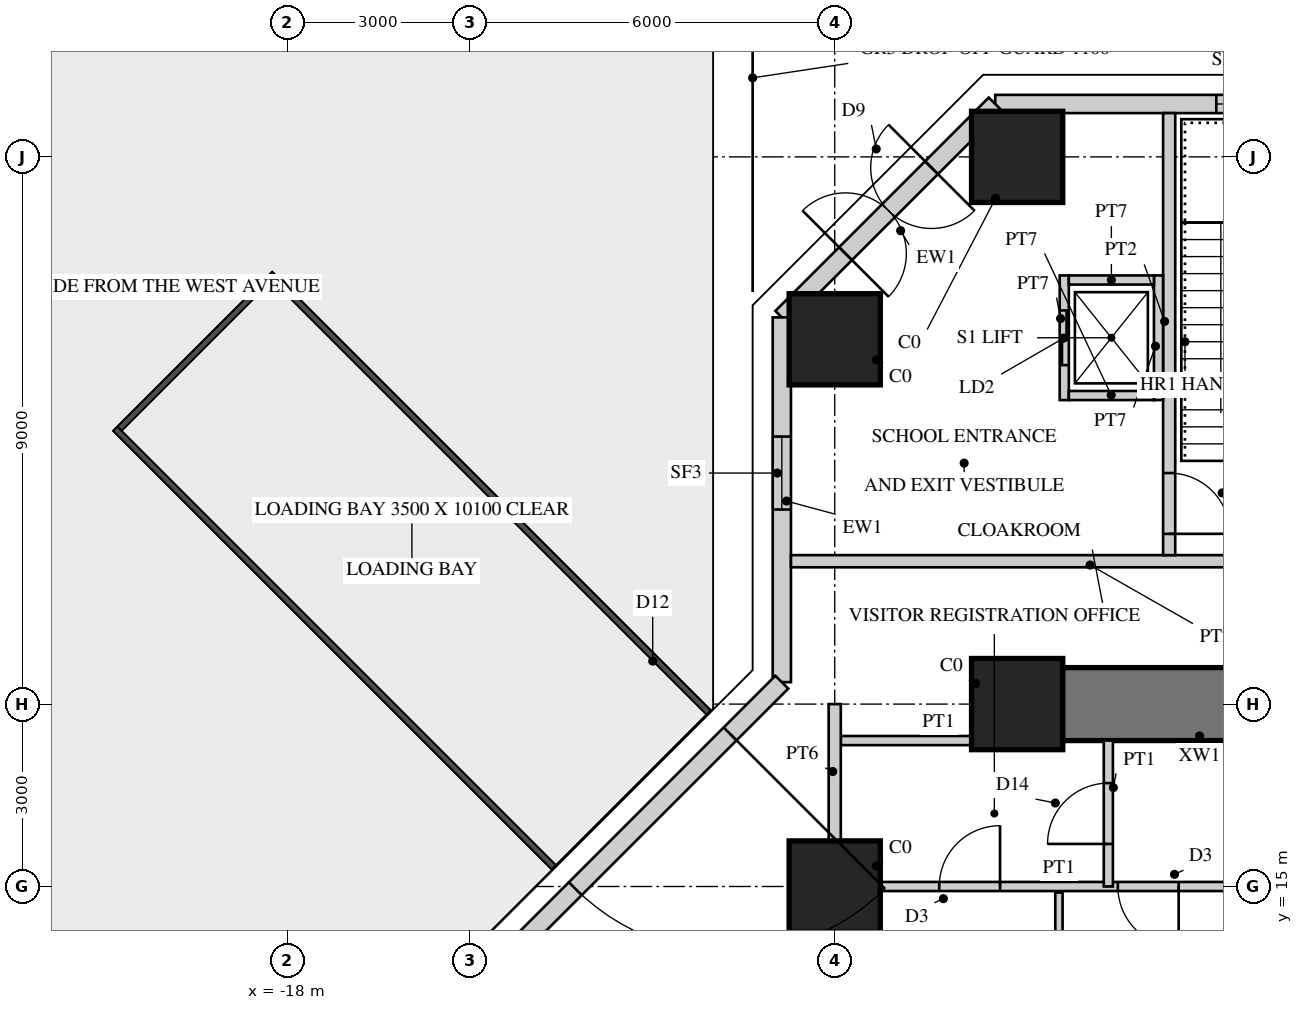
"""IFC4 building model, lengths in metres.
Left out: names, types, materials, properties, quantities, classifications, styles, units other than length and angle.
Written with IfcOpenShell. Run it as: python <this file> out.ifc"""

import sys

from ifc_helpers import new_model, si_unit, direction, frame, frame_2d, origin, origin_2d, place, context, subcontext, project, spatial, rectangle, hollow_rectangle, extrude, element, fill, save


model = new_model("IFC4")
c1 = context("Model", 3, precision=1e-05, world=origin(), true_north=direction((0.0, 1.0)))
c2 = subcontext(c1, "Body", "Model", "MODEL_VIEW")
j1 = project(units=[si_unit("LENGTHUNIT", "METRE"), si_unit("PLANEANGLEUNIT", "RADIAN")], contexts=[c1])
p1 = place(None, origin())
s1 = spatial("IfcSite", under=j1, at=p1, CompositionType="ELEMENT")
p2 = place(p1, origin())
s2 = spatial("IfcBuilding", under=s1, at=p2, CompositionType="ELEMENT")
p3 = place(p2, origin())
s3 = spatial("IfcBuildingStorey", under=s2, at=p3, CompositionType="ELEMENT", Elevation=0.0)
p4 = place(p3, frame((0.0, 18.0, 0.0), z_axis=(0.0, 0.0, 1.0), x_axis=(-1.0, 0.0, 0.0)))
e1 = element("IfcWall", 1, at=p4, inside=s3, PredefinedType="SHEAR", context=c2, shape_type="SweptSolid", body=[
    extrude(rectangle(XDim=6.0, YDim=1.2, at=frame_2d((3.0, 0.0))), origin(), (0.0, 0.0, 1.0), 5.0),
])
for number, where, z_axis, x_axis in (
    (2, (-9.0, 15.0, 0.0), (0.0, 0.0, 1.0), (1.0, 0.0, 0.0)),
    (3, (-9.0, 24.0, 0.0), (0.0, 0.0, 1.0), (1.0, 0.0, 0.0)),
    (4, (-6.0, 27.0, 0.0), (0.0, 0.0, 1.0), (1.0, 0.0, 0.0)),
    (5, (-6.0, 18.0, 0.0), (0.0, 0.0, 1.0), (1.0, 0.0, 0.0)),
):
    element("IfcColumn", number, at=place(p3, frame(where, z_axis=z_axis, x_axis=x_axis)), inside=s3, PredefinedType="COLUMN", context=c2, shape_type="SweptSolid", body=[
        extrude(rectangle(XDim=1.5, YDim=1.5, at=origin_2d()), origin(), (0.0, 0.0, 1.0), 5.0),
    ])
p5 = place(p3, frame((6.36, 27.87, 0.0), z_axis=(0.0, 0.0, 1.0), x_axis=(-1.0, 0.0, 0.0)))
e6 = element("IfcWall", 6, at=p5, inside=s3, PredefinedType="SOLIDWALL", context=c2, shape_type="SweptSolid", body=[
    extrude(rectangle(XDim=12.721, YDim=0.3, at=frame_2d((6.36, 0.0))), origin(), (0.0, 0.0, 1.0), 4.8),
])
p6 = place(p5, frame((3.11, 0.0, 0.0)))
e7 = element("IfcOpeningElement", 7, at=p6, cuts=e6, PredefinedType="OPENING", context=c2, shape_type="SweptSolid", body=[
    extrude(rectangle(XDim=2.0, YDim=2.6, at=frame_2d((1.0, 1.3))), frame((0.0, 0.16, 0.0), z_axis=(0.0, -1.0, 0.0), x_axis=(1.0, 0.0, 0.0)), (0.0, 0.0, 1.0), 0.32),
])
p7 = place(p5, frame((7.885, 0.0, 0.3)))
e8 = element("IfcOpeningElement", 8, at=p7, cuts=e6, PredefinedType="OPENING", context=c2, shape_type="SweptSolid", body=[
    extrude(rectangle(XDim=1.2, YDim=3.9, at=frame_2d((0.6, 1.95))), frame((0.0, 0.16, 0.0), z_axis=(0.0, -1.0, 0.0), x_axis=(1.0, 0.0, 0.0)), (0.0, 0.0, 1.0), 0.32),
])
p8 = place(p3, frame((-6.36, 27.87, 0.0), z_axis=(0.0, 0.0, 1.0), x_axis=(-0.707106781187, -0.707106781187, 0.0)))
e9 = element("IfcWall", 9, at=p8, inside=s3, PredefinedType="SOLIDWALL", context=c2, shape_type="SweptSolid", body=[
    extrude(rectangle(XDim=4.964, YDim=0.3, at=frame_2d((2.482, 0.0))), origin(), (0.0, 0.0, 1.0), 4.8),
])
p9 = place(p8, frame((1.482, 0.0, 0.0)))
e10 = element("IfcOpeningElement", 10, at=p9, cuts=e9, PredefinedType="OPENING", context=c2, shape_type="SweptSolid", body=[
    extrude(rectangle(XDim=2.0, YDim=2.6, at=frame_2d((1.0, 1.3))), frame((0.0, 0.16, 0.0), z_axis=(0.0, -1.0, 0.0), x_axis=(1.0, 0.0, 0.0)), (0.0, 0.0, 1.0), 0.32),
])
p10 = place(p3, frame((-9.87, 24.36, 0.0), z_axis=(0.0, 0.0, 1.0), x_axis=(0.0, -1.0, 0.0)))
e11 = element("IfcWall", 11, at=p10, inside=s3, PredefinedType="SOLIDWALL", context=c2, shape_type="SweptSolid", body=[
    extrude(rectangle(XDim=6.0, YDim=0.3, at=frame_2d((3.0, 0.0))), origin(), (0.0, 0.0, 1.0), 4.8),
])
p11 = place(p10, frame((1.96, 0.0, 0.3)))
e12 = element("IfcOpeningElement", 12, at=p11, cuts=e11, PredefinedType="OPENING", context=c2, shape_type="SweptSolid", body=[
    extrude(rectangle(XDim=1.2, YDim=3.9, at=frame_2d((0.6, 1.95))), frame((0.0, 0.16, 0.0), z_axis=(0.0, -1.0, 0.0), x_axis=(1.0, 0.0, 0.0)), (0.0, 0.0, 1.0), 0.32),
])
p12 = place(p3, frame((-9.87, 18.36, 0.0), z_axis=(0.0, 0.0, 1.0), x_axis=(-0.707106781187, -0.707106781187, 0.0)))
e13 = element("IfcWall", 13, at=p12, inside=s3, PredefinedType="SOLIDWALL", context=c2, shape_type="SweptSolid", body=[
    extrude(rectangle(XDim=12.007, YDim=0.3, at=frame_2d((6.003, 0.0))), origin(), (0.0, 0.0, 1.0), 4.8),
])
p13 = place(p12, frame((1.204, 0.0, 0.0)))
e14 = element("IfcOpeningElement", 14, at=p13, cuts=e13, PredefinedType="OPENING", context=c2, shape_type="SweptSolid", body=[
    extrude(rectangle(XDim=3.6, YDim=4.2, at=frame_2d((1.8, 2.1))), frame((0.0, 0.16, 0.0), z_axis=(0.0, -1.0, 0.0), x_axis=(1.0, 0.0, 0.0)), (0.0, 0.0, 1.0), 0.32),
])
p14 = place(p3, frame((-2.375, 15.0, 0.0), z_axis=(0.0, 0.0, 1.0), x_axis=(-1.0, 0.0, 0.0)))
e15 = element("IfcWall", 15, at=p14, inside=s3, PredefinedType="PARTITIONING", context=c2, shape_type="SweptSolid", body=[
    extrude(rectangle(XDim=5.875, YDim=0.15, at=frame_2d((2.938, 0.0))), origin(), (0.0, 0.0, 1.0), 3.85),
])
p15 = place(p14, frame((0.969, 0.0, 0.0)))
e16 = element("IfcOpeningElement", 16, at=p15, cuts=e15, PredefinedType="OPENING", context=c2, shape_type="SweptSolid", body=[
    extrude(rectangle(XDim=1.0, YDim=2.1, at=frame_2d((0.5, 1.05))), frame((0.0, 0.085, 0.0), z_axis=(0.0, -1.0, 0.0), x_axis=(1.0, 0.0, 0.0)), (0.0, 0.0, 1.0), 0.17),
])
p16 = place(p14, frame((3.906, 0.0, 0.0)))
e17 = element("IfcOpeningElement", 17, at=p16, cuts=e15, PredefinedType="OPENING", context=c2, shape_type="SweptSolid", body=[
    extrude(rectangle(XDim=1.0, YDim=2.1, at=frame_2d((0.5, 1.05))), frame((0.0, 0.085, 0.0), z_axis=(0.0, -1.0, 0.0), x_axis=(1.0, 0.0, 0.0)), (0.0, 0.0, 1.0), 0.17),
])
p17 = place(p3, frame((-5.312, 9.65, 0.0), z_axis=(0.0, 0.0, 1.0), x_axis=(0.0, 1.0, 0.0)))
e18 = element("IfcWall", 18, at=p17, inside=s3, PredefinedType="PLUMBINGWALL", context=c2, shape_type="SweptSolid", body=[
    extrude(rectangle(XDim=5.25, YDim=0.12, at=frame_2d((2.625, 0.0))), origin(), (0.0, 0.0, 1.0), 4.8),
])
p18 = place(p3, frame((-4.5, 15.0, 0.0), z_axis=(0.0, 0.0, 1.0), x_axis=(0.0, 1.0, 0.0)))
e19 = element("IfcWall", 19, at=p18, inside=s3, PredefinedType="PARTITIONING", context=c2, shape_type="SweptSolid", body=[
    extrude(rectangle(XDim=2.4, YDim=0.15, at=frame_2d((1.2, 0.0))), origin(), (0.0, 0.0, 1.0), 4.8),
])
p19 = place(p18, frame((0.7, 0.0, 0.0)))
e20 = element("IfcOpeningElement", 20, at=p19, cuts=e19, PredefinedType="OPENING", context=c2, shape_type="SweptSolid", body=[
    extrude(rectangle(XDim=1.0, YDim=2.2, at=frame_2d((0.5, 1.1))), frame((0.0, 0.085, 0.0), z_axis=(0.0, -1.0, 0.0), x_axis=(1.0, 0.0, 0.0)), (0.0, 0.0, 1.0), 0.17),
])
p20 = place(p3, frame((-0.1, 20.35, 0.0), z_axis=(0.0, 0.0, 1.0), x_axis=(-1.0, 0.0, 0.0)))
e21 = element("IfcWall", 21, at=p20, inside=s3, PredefinedType="SOLIDWALL", context=c2, shape_type="SweptSolid", body=[
    extrude(rectangle(XDim=9.62, YDim=0.2, at=frame_2d((4.81, 0.0))), origin(), (0.0, 0.0, 1.0), 4.8),
])
p21 = place(p3, frame((-3.5, 20.45, 0.0), z_axis=(0.0, 0.0, 1.0), x_axis=(0.0, 1.0, 0.0)))
e22 = element("IfcWall", 22, at=p21, inside=s3, PredefinedType="SOLIDWALL", context=c2, shape_type="SweptSolid", body=[
    extrude(rectangle(XDim=7.27, YDim=0.2, at=frame_2d((3.635, 0.0))), origin(), (0.0, 0.0, 1.0), 4.8),
])
p22 = place(p21, frame((0.35, 0.0, 0.0)))
e23 = element("IfcOpeningElement", 23, at=p22, cuts=e22, PredefinedType="OPENING", context=c2, shape_type="SweptSolid", body=[
    extrude(rectangle(XDim=1.0, YDim=2.1, at=frame_2d((0.5, 1.05))), frame((0.0, 0.11, 0.0), z_axis=(0.0, -1.0, 0.0), x_axis=(1.0, 0.0, 0.0)), (0.0, 0.0, 1.0), 0.22),
])
p23 = place(p3, frame((-3.675, 23.0, 0.0), z_axis=(0.0, 0.0, 1.0), x_axis=(0.0, 1.0, 0.0)))
e24 = element("IfcWall", 24, at=p23, inside=s3, PredefinedType="PARTITIONING", context=c2, shape_type="SweptSolid", body=[
    extrude(rectangle(XDim=2.05, YDim=0.15, at=frame_2d((1.025, 0.0))), origin(), (0.0, 0.0, 1.0), 4.8),
])
p24 = place(p3, frame((-5.225, 23.0, 0.0), z_axis=(0.0, 0.0, 1.0), x_axis=(0.0, 1.0, 0.0)))
e25 = element("IfcWall", 25, at=p24, inside=s3, PredefinedType="PARTITIONING", context=c2, shape_type="SweptSolid", body=[
    extrude(rectangle(XDim=2.05, YDim=0.15, at=frame_2d((1.025, 0.0))), origin(), (0.0, 0.0, 1.0), 4.8),
])
p25 = place(p24, frame((0.575, 0.0, 0.0)))
e26 = element("IfcOpeningElement", 26, at=p25, cuts=e25, PredefinedType="OPENING", context=c2, shape_type="SweptSolid", body=[
    extrude(rectangle(XDim=0.9, YDim=2.1, at=frame_2d((0.45, 1.05))), frame((0.0, 0.085, 0.0), z_axis=(0.0, -1.0, 0.0), x_axis=(1.0, 0.0, 0.0)), (0.0, 0.0, 1.0), 0.17),
])
for number, where, z_axis, x_axis in (
    (27, (-3.75, 23.075, 0.0), (0.0, 0.0, 1.0), (-1.0, 0.0, 0.0)),
    (28, (-3.75, 24.975, 0.0), (0.0, 0.0, 1.0), (-1.0, 0.0, 0.0)),
):
    element("IfcWall", number, at=place(p3, frame(where, z_axis=z_axis, x_axis=x_axis)), inside=s3, PredefinedType="PARTITIONING", context=c2, shape_type="SweptSolid", body=[
        extrude(rectangle(XDim=1.4, YDim=0.15, at=frame_2d((0.7, 0.0))), origin(), (0.0, 0.0, 1.0), 4.8),
    ])
p26 = place(p3, frame((-6.75, 17.4, 0.0), z_axis=(0.0, 0.0, 1.0), x_axis=(-1.0, 0.0, 0.0)))
e29 = element("IfcWall", 29, at=p26, inside=s3, PredefinedType="PARTITIONING", context=c2, shape_type="SweptSolid", body=[
    extrude(rectangle(XDim=2.15, YDim=0.15, at=frame_2d((1.075, 0.0))), origin(), (0.0, 0.0, 1.0), 4.8),
])
p27 = place(p3, frame((-9.0, 15.75, 0.0), z_axis=(0.0, 0.0, 1.0), x_axis=(0.0, 1.0, 0.0)))
e30 = element("IfcWall", 30, at=p27, inside=s3, PredefinedType="SOLIDWALL", context=c2, shape_type="SweptSolid", body=[
    extrude(rectangle(XDim=2.25, YDim=0.2, at=frame_2d((1.125, 0.0))), origin(), (0.0, 0.0, 1.0), 3.8),
])
p28 = place(p7, origin())
e31 = element("IfcWindow", 31, at=p28, inside=s3, PartitioningType="SINGLE_PANEL", PredefinedType="WINDOW", context=c2, shape_type="SweptSolid", body=[
    extrude(hollow_rectangle(XDim=1.2, YDim=3.9, WallThickness=0.06, at=frame_2d((0.6, 1.95))), frame((0.0, 0.03, 0.0), z_axis=(0.0, -1.0, 0.0), x_axis=(1.0, 0.0, 0.0)), (0.0, 0.0, 1.0), 0.06),
    extrude(rectangle(XDim=1.079, YDim=3.779, at=frame_2d((0.6, 1.95))), frame((0.0, 0.03, 0.0), z_axis=(0.0, -1.0, 0.0), x_axis=(1.0, 0.0, 0.0)), (0.0, 0.0, 1.0), 0.06),
])
fill(e8, e31)
p29 = place(p11, origin())
e32 = element("IfcWindow", 32, at=p29, inside=s3, PartitioningType="SINGLE_PANEL", PredefinedType="WINDOW", context=c2, shape_type="SweptSolid", body=[
    extrude(hollow_rectangle(XDim=1.2, YDim=3.9, WallThickness=0.06, at=frame_2d((0.6, 1.95))), frame((0.0, 0.03, 0.0), z_axis=(0.0, -1.0, 0.0), x_axis=(1.0, 0.0, 0.0)), (0.0, 0.0, 1.0), 0.06),
    extrude(rectangle(XDim=1.079, YDim=3.779, at=frame_2d((0.6, 1.95))), frame((0.0, 0.03, 0.0), z_axis=(0.0, -1.0, 0.0), x_axis=(1.0, 0.0, 0.0)), (0.0, 0.0, 1.0), 0.06),
])
fill(e12, e32)
p30 = place(p13, origin())
e33 = element("IfcDoor", 33, at=p30, inside=s3, OperationType="USERDEFINED", PredefinedType="DOOR", context=c2, shape_type="SweptSolid", body=[
    extrude(rectangle(XDim=3.6, YDim=4.2, at=frame_2d((1.8, 2.1))), frame((0.0, 0.025, 0.0), z_axis=(0.0, -1.0, 0.0), x_axis=(1.0, 0.0, 0.0)), (0.0, 0.0, 1.0), 0.05),
])
fill(e14, e33)
p31 = place(p15, origin())
e34 = element("IfcDoor", 34, at=p31, inside=s3, OperationType="SINGLE_SWING_LEFT", PredefinedType="DOOR", context=c2, shape_type="SweptSolid", body=[
    extrude(rectangle(XDim=1.0, YDim=2.1, at=frame_2d((0.5, 1.05))), frame((0.0, 0.025, 0.0), z_axis=(0.0, -1.0, 0.0), x_axis=(1.0, 0.0, 0.0)), (0.0, 0.0, 1.0), 0.05),
])
fill(e16, e34)
p32 = place(p16, frame((1.0, 0.0, 0.0), z_axis=(0.0, 0.0, 1.0), x_axis=(-1.0, 0.0, 0.0)))
e35 = element("IfcDoor", 35, at=p32, inside=s3, OperationType="SINGLE_SWING_RIGHT", PredefinedType="DOOR", context=c2, shape_type="SweptSolid", body=[
    extrude(rectangle(XDim=1.0, YDim=2.1, at=frame_2d((0.5, 1.05))), frame((0.0, 0.025, 0.0), z_axis=(0.0, -1.0, 0.0), x_axis=(1.0, 0.0, 0.0)), (0.0, 0.0, 1.0), 0.05),
])
fill(e17, e35)
p33 = place(p19, origin())
e36 = element("IfcDoor", 36, at=p33, inside=s3, OperationType="SINGLE_SWING_LEFT", PredefinedType="DOOR", context=c2, shape_type="SweptSolid", body=[
    extrude(rectangle(XDim=1.0, YDim=2.2, at=frame_2d((0.5, 1.1))), frame((0.0, 0.025, 0.0), z_axis=(0.0, -1.0, 0.0), x_axis=(1.0, 0.0, 0.0)), (0.0, 0.0, 1.0), 0.05),
])
fill(e20, e36)
p34 = place(p22, frame((1.0, 0.0, 0.0), z_axis=(0.0, 0.0, 1.0), x_axis=(-1.0, 0.0, 0.0)))
e37 = element("IfcDoor", 37, at=p34, inside=s3, OperationType="SINGLE_SWING_RIGHT", PredefinedType="DOOR", context=c2, shape_type="SweptSolid", body=[
    extrude(rectangle(XDim=1.0, YDim=2.1, at=frame_2d((0.5, 1.05))), frame((0.0, 0.025, 0.0), z_axis=(0.0, -1.0, 0.0), x_axis=(1.0, 0.0, 0.0)), (0.0, 0.0, 1.0), 0.05),
])
fill(e23, e37)
p35 = place(p25, origin())
e38 = element("IfcDoor", 38, at=p35, inside=s3, OperationType="DOUBLE_DOOR_SLIDING", PredefinedType="DOOR", context=c2, shape_type="SweptSolid", body=[
    extrude(rectangle(XDim=0.9, YDim=2.1, at=frame_2d((0.45, 1.05))), frame((0.0, 0.025, 0.0), z_axis=(0.0, -1.0, 0.0), x_axis=(1.0, 0.0, 0.0)), (0.0, 0.0, 1.0), 0.05),
])
fill(e26, e38)
p36 = place(p9, origin())
e39 = element("IfcDoor", 39, at=p36, inside=s3, OperationType="DOUBLE_DOOR_DOUBLE_SWING", PredefinedType="DOOR", context=c2, shape_type="SweptSolid", body=[
    extrude(hollow_rectangle(XDim=2.0, YDim=2.6, WallThickness=0.06, at=frame_2d((1.0, 1.3))), frame((0.0, 0.025, 0.0), z_axis=(0.0, -1.0, 0.0), x_axis=(1.0, 0.0, 0.0)), (0.0, 0.0, 1.0), 0.05),
    extrude(rectangle(XDim=1.879, YDim=2.479, at=frame_2d((1.0, 1.3))), frame((0.0, 0.025, 0.0), z_axis=(0.0, -1.0, 0.0), x_axis=(1.0, 0.0, 0.0)), (0.0, 0.0, 1.0), 0.05),
])
fill(e10, e39)
save(model, sys.argv[1])
